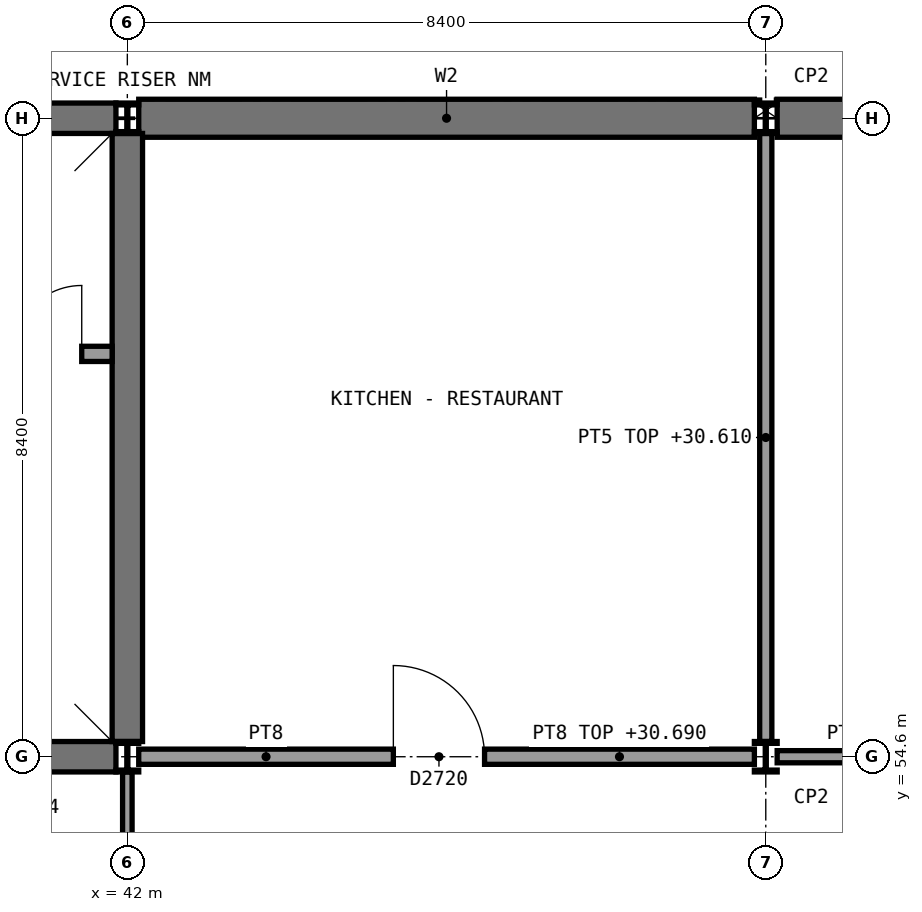
"""IFC4 building model, lengths in metres.
Left out: names, types, materials, properties, quantities, classifications, styles, units other than length and angle.
Written with IfcOpenShell. Run it as: python <this file> out.ifc"""

import sys

from ifc_helpers import new_model, si_unit, direction, frame, frame_2d, origin, origin_2d, place, context, subcontext, project, spatial, rectangle, i_section, extrude, element, fill, save


model = new_model("IFC4")
c1 = context("Model", 3, precision=1e-05, world=origin(), true_north=direction((0.0, 1.0)))
c2 = subcontext(c1, "Body", "Model", "MODEL_VIEW")
j1 = project(units=[si_unit("LENGTHUNIT", "METRE"), si_unit("PLANEANGLEUNIT", "RADIAN")], contexts=[c1])
p1 = place(None, origin())
s1 = spatial("IfcSite", under=j1, at=p1, CompositionType="ELEMENT")
p2 = place(p1, origin())
s2 = spatial("IfcBuilding", under=s1, at=p2, CompositionType="ELEMENT")
p3 = place(p2, frame((0.0, 0.0, 25.8)))
s3 = spatial("IfcBuildingStorey", under=s2, at=p3, CompositionType="ELEMENT", Elevation=25.8)
p4 = place(p3, frame((42.15, 63.0, 0.0), z_axis=(0.0, 0.0, 1.0), x_axis=(1.0, 0.0, 0.0)))
e1 = element("IfcWall", 1, at=p4, inside=s3, PredefinedType="SHEAR", context=c2, shape_type="SweptSolid", body=[
    extrude(rectangle(XDim=8.1, YDim=0.5, at=frame_2d((4.05, 0.0))), origin(), (0.0, 0.0, 1.0), 5.2),
])
p5 = place(p3, frame((50.55, 63.0, 0.0), z_axis=(0.0, 0.0, 1.0), x_axis=(1.0, 0.0, 0.0)))
e2 = element("IfcWall", 2, at=p5, inside=s3, PredefinedType="SHEAR", context=c2, shape_type="SweptSolid", body=[
    extrude(rectangle(XDim=8.1, YDim=0.5, at=frame_2d((4.05, 0.0))), origin(), (0.0, 0.0, 1.0), 5.2),
])
p6 = place(p3, frame((33.75, 63.0, 0.0), z_axis=(0.0, 0.0, 1.0), x_axis=(1.0, 0.0, 0.0)))
e3 = element("IfcWall", 3, at=p6, inside=s3, PredefinedType="SHEAR", context=c2, shape_type="SweptSolid", body=[
    extrude(rectangle(XDim=8.1, YDim=0.4, at=frame_2d((4.05, 0.0))), origin(), (0.0, 0.0, 1.0), 4.51),
])
p7 = place(p3, frame((33.75, 54.6, 0.0), z_axis=(0.0, 0.0, 1.0), x_axis=(1.0, 0.0, 0.0)))
e4 = element("IfcWall", 4, at=p7, inside=s3, PredefinedType="SHEAR", context=c2, shape_type="SweptSolid", body=[
    extrude(rectangle(XDim=8.1, YDim=0.4, at=frame_2d((4.05, 0.0))), origin(), (0.0, 0.0, 1.0), 4.51),
])
p8 = place(p7, frame((1.15, 0.0, 0.0)))
e5 = element("IfcOpeningElement", 5, at=p8, cuts=e4, PredefinedType="OPENING", context=c2, shape_type="SweptSolid", body=[
    extrude(rectangle(XDim=1.8, YDim=2.1, at=frame_2d((0.9, 1.05))), frame((0.0, 0.21, 0.0), z_axis=(0.0, -1.0, 0.0), x_axis=(1.0, 0.0, 0.0)), (0.0, 0.0, 1.0), 0.42),
])
p9 = place(p7, frame((5.3, 0.0, 0.0)))
e6 = element("IfcOpeningElement", 6, at=p9, cuts=e4, PredefinedType="OPENING", context=c2, shape_type="SweptSolid", body=[
    extrude(rectangle(XDim=1.8, YDim=2.1, at=frame_2d((0.9, 1.05))), frame((0.0, 0.21, 0.0), z_axis=(0.0, -1.0, 0.0), x_axis=(1.0, 0.0, 0.0)), (0.0, 0.0, 1.0), 0.42),
])
p10 = place(p3, frame((42.0, 54.8, 0.0), z_axis=(0.0, 0.0, 1.0), x_axis=(0.0, 1.0, 0.0)))
e7 = element("IfcWall", 7, at=p10, inside=s3, PredefinedType="SHEAR", context=c2, shape_type="SweptSolid", body=[
    extrude(rectangle(XDim=8.0, YDim=0.4, at=frame_2d((4.0, 0.0))), origin(), (0.0, 0.0, 1.0), 5.2),
])
for number, where, z_axis, x_axis in (
    (8, (42.0, 54.6, 0.0), (0.0, 0.0, 1.0), (1.0, 0.0, 0.0)),
    (9, (42.0, 63.0, 0.0), (0.0, 0.0, 1.0), (1.0, 0.0, 0.0)),
    (10, (50.4, 54.6, 0.0), (0.0, 0.0, 1.0), (1.0, 0.0, 0.0)),
    (11, (50.4, 63.0, 0.0), (0.0, 0.0, 1.0), (1.0, 0.0, 0.0)),
):
    element("IfcColumn", number, at=place(p3, frame(where, z_axis=z_axis, x_axis=x_axis)), inside=s3, PredefinedType="COLUMN", context=c2, shape_type="SweptSolid", body=[
        extrude(i_section(OverallWidth=0.3, OverallDepth=0.4, WebThickness=0.013, FlangeThickness=0.024, FilletRadius=0.027, at=origin_2d()), origin(), (0.0, 0.0, 1.0), 5.4),
    ])
p11 = place(p3, frame((50.4, 54.8, 0.0), z_axis=(0.0, 0.0, 1.0), x_axis=(0.0, 1.0, 0.0)))
e12 = element("IfcWall", 12, at=p11, inside=s3, PredefinedType="PARTITIONING", context=c2, shape_type="SweptSolid", body=[
    extrude(rectangle(XDim=8.0, YDim=0.16, at=frame_2d((4.0, 0.0))), origin(), (0.0, 0.0, 1.0), 4.81),
])
p12 = place(p3, frame((42.15, 54.6, 0.0), z_axis=(0.0, 0.0, 1.0), x_axis=(1.0, 0.0, 0.0)))
e13 = element("IfcWall", 13, at=p12, inside=s3, PredefinedType="SOLIDWALL", context=c2, shape_type="SweptSolid", body=[
    extrude(rectangle(XDim=8.1, YDim=0.2, at=frame_2d((4.05, 0.0))), origin(), (0.0, 0.0, 1.0), 4.89),
])
p13 = place(p12, frame((3.35, 0.0, 0.0)))
e14 = element("IfcOpeningElement", 14, at=p13, cuts=e13, PredefinedType="OPENING", context=c2, shape_type="SweptSolid", body=[
    extrude(rectangle(XDim=1.2, YDim=2.1, at=frame_2d((0.6, 1.05))), frame((0.0, 0.11, 0.0), z_axis=(0.0, -1.0, 0.0), x_axis=(1.0, 0.0, 0.0)), (0.0, 0.0, 1.0), 0.22),
])
p14 = place(p3, frame((50.55, 54.6, 0.0), z_axis=(0.0, 0.0, 1.0), x_axis=(1.0, 0.0, 0.0)))
e15 = element("IfcWall", 15, at=p14, inside=s3, PredefinedType="PARTITIONING", context=c2, shape_type="SweptSolid", body=[
    extrude(rectangle(XDim=8.1, YDim=0.16, at=frame_2d((4.05, 0.0))), origin(), (0.0, 0.0, 1.0), 4.89),
])
p15 = place(p14, frame((3.6, 0.0, 0.0)))
e16 = element("IfcOpeningElement", 16, at=p15, cuts=e15, PredefinedType="OPENING", context=c2, shape_type="SweptSolid", body=[
    extrude(rectangle(XDim=1.1, YDim=2.1, at=frame_2d((0.55, 1.05))), frame((0.0, 0.09, 0.0), z_axis=(0.0, -1.0, 0.0), x_axis=(1.0, 0.0, 0.0)), (0.0, 0.0, 1.0), 0.18),
])
p16 = place(p3, frame((42.0, 46.4, 0.0), z_axis=(0.0, 0.0, 1.0), x_axis=(0.0, 1.0, 0.0)))
e17 = element("IfcWall", 17, at=p16, inside=s3, PredefinedType="PARTITIONING", context=c2, shape_type="SweptSolid", body=[
    extrude(rectangle(XDim=8.0, YDim=0.125, at=frame_2d((4.0, 0.0))), origin(), (0.0, 0.0, 1.0), 4.81),
])
p17 = place(p16, frame((3.1, 0.0, 0.0)))
e18 = element("IfcOpeningElement", 18, at=p17, cuts=e17, PredefinedType="OPENING", context=c2, shape_type="SweptSolid", body=[
    extrude(rectangle(XDim=1.8, YDim=2.1, at=frame_2d((0.9, 1.05))), frame((0.0, 0.073, 0.0), z_axis=(0.0, -1.0, 0.0), x_axis=(1.0, 0.0, 0.0)), (0.0, 0.0, 1.0), 0.145),
])
p18 = place(p3, frame((40.05, 59.9, 0.0), z_axis=(0.0, 0.0, 1.0), x_axis=(1.0, 0.0, 0.0)))
e19 = element("IfcWall", 19, at=p18, inside=s3, PredefinedType="PARTITIONING", context=c2, shape_type="SweptSolid", body=[
    extrude(rectangle(XDim=1.75, YDim=0.2, at=frame_2d((0.875, 0.0))), origin(), (0.0, 0.0, 1.0), 5.2),
])
p19 = place(p18, frame((0.45, 0.0, 0.0)))
e20 = element("IfcOpeningElement", 20, at=p19, cuts=e19, PredefinedType="OPENING", context=c2, shape_type="SweptSolid", body=[
    extrude(rectangle(XDim=0.9, YDim=2.1, at=frame_2d((0.45, 1.05))), frame((0.0, 0.11, 0.0), z_axis=(0.0, -1.0, 0.0), x_axis=(1.0, 0.0, 0.0)), (0.0, 0.0, 1.0), 0.22),
])
p20 = place(p13, origin())
e21 = element("IfcDoor", 21, at=p20, inside=s3, OperationType="SINGLE_SWING_LEFT", PredefinedType="DOOR", context=c2, shape_type="SweptSolid", body=[
    extrude(rectangle(XDim=1.2, YDim=2.1, at=frame_2d((0.6, 1.05))), frame((0.0, 0.025, 0.0), z_axis=(0.0, -1.0, 0.0), x_axis=(1.0, 0.0, 0.0)), (0.0, 0.0, 1.0), 0.05),
])
fill(e14, e21)
p21 = place(p19, origin())
e22 = element("IfcDoor", 22, at=p21, inside=s3, OperationType="SINGLE_SWING_RIGHT", PredefinedType="DOOR", context=c2, shape_type="SweptSolid", body=[
    extrude(rectangle(XDim=0.9, YDim=2.1, at=frame_2d((0.45, 1.05))), frame((0.0, 0.025, 0.0), z_axis=(0.0, -1.0, 0.0), x_axis=(1.0, 0.0, 0.0)), (0.0, 0.0, 1.0), 0.05),
])
fill(e20, e22)
save(model, sys.argv[1])
